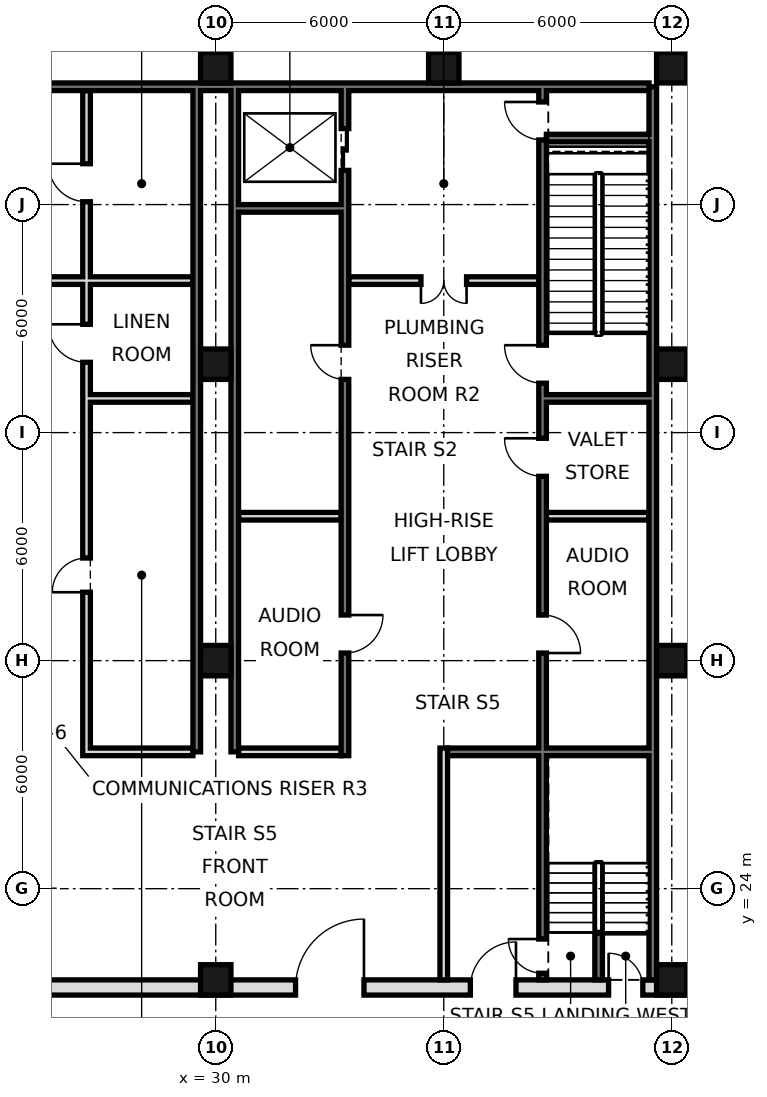
"""IFC4 building model, lengths in metres.
Left out: names, types, materials, properties, quantities, classifications, styles, units other than length and angle.
Written with IfcOpenShell. Run it as: python <this file> out.ifc"""

import sys

from ifc_helpers import new_model, si_unit, direction, frame, frame_2d, origin, origin_2d, place, context, subcontext, project, spatial, rectangle, hollow_rectangle, extrude, element, fill, save


model = new_model("IFC4")
c1 = context("Model", 3, precision=1e-05, world=origin(), true_north=direction((0.0, 1.0)))
c2 = subcontext(c1, "Body", "Model", "MODEL_VIEW")
j1 = project(units=[si_unit("LENGTHUNIT", "METRE"), si_unit("PLANEANGLEUNIT", "RADIAN")], contexts=[c1])
p1 = place(None, origin())
s1 = spatial("IfcSite", under=j1, at=p1, CompositionType="ELEMENT")
p2 = place(p1, origin())
s2 = spatial("IfcBuilding", under=s1, at=p2, CompositionType="ELEMENT")
p3 = place(p2, frame((0.0, 0.0, 44.4)))
s3 = spatial("IfcBuildingStorey", under=s2, at=p3, CompositionType="ELEMENT", Elevation=44.4)
for number, where, z_axis, x_axis in (
    (1, (30.0, 21.6, 0.0), (0.0, 0.0, 1.0), (1.0, 0.0, 0.0)),
    (2, (30.0, 30.0, 0.0), (0.0, 0.0, 1.0), (1.0, 0.0, 0.0)),
    (3, (30.0, 37.8, 0.0), (0.0, 0.0, 1.0), (1.0, 0.0, 0.0)),
    (4, (30.0, 45.6, 0.0), (0.0, 0.0, 1.0), (1.0, 0.0, 0.0)),
    (5, (36.0, 45.6, 0.0), (0.0, 0.0, 1.0), (1.0, 0.0, 0.0)),
    (6, (42.0, 21.6, 0.0), (0.0, 0.0, 1.0), (1.0, 0.0, 0.0)),
    (7, (42.0, 30.0, 0.0), (0.0, 0.0, 1.0), (1.0, 0.0, 0.0)),
    (8, (42.0, 37.8, 0.0), (0.0, 0.0, 1.0), (1.0, 0.0, 0.0)),
    (9, (42.0, 45.6, 0.0), (0.0, 0.0, 1.0), (1.0, 0.0, 0.0)),
):
    element("IfcColumn", number, at=place(p3, frame(where, z_axis=z_axis, x_axis=x_axis)), inside=s3, PredefinedType="COLUMN", context=c2, shape_type="SweptSolid", body=[
        extrude(hollow_rectangle(XDim=0.8, YDim=0.8, WallThickness=0.07, at=origin_2d()), origin(), (0.0, 0.0, 1.0), 5.4),
    ])
p4 = place(p3, frame((41.5, 21.6, 0.0), z_axis=(0.0, 0.0, 1.0), x_axis=(0.0, 1.0, 0.0)))
e10 = element("IfcWall", 10, at=p4, inside=s3, PredefinedType="SOLIDWALL", context=c2, shape_type="SweptSolid", body=[
    extrude(rectangle(XDim=23.5, YDim=0.2, at=frame_2d((11.75, 0.0))), origin(), (0.0, 0.0, 1.0), 5.22),
])
p5 = place(p3, frame((6.6, 45.1, 0.0), z_axis=(0.0, 0.0, 1.0), x_axis=(1.0, 0.0, 0.0)))
e11 = element("IfcWall", 11, at=p5, inside=s3, PredefinedType="SOLIDWALL", context=c2, shape_type="SweptSolid", body=[
    extrude(rectangle(XDim=34.8, YDim=0.2, at=frame_2d((17.4, 0.0))), origin(), (0.0, 0.0, 1.0), 5.22),
])
for number, where, z_axis, x_axis in (
    (12, (29.5, 27.6, 0.0), (0.0, 0.0, 1.0), (0.0, 1.0, 0.0)),
    (13, (30.5, 27.6, 0.0), (0.0, 0.0, 1.0), (0.0, 1.0, 0.0)),
):
    element("IfcWall", number, at=place(p3, frame(where, z_axis=z_axis, x_axis=x_axis)), inside=s3, PredefinedType="SOLIDWALL", context=c2, shape_type="SweptSolid", body=[
        extrude(rectangle(XDim=17.5, YDim=0.2, at=frame_2d((8.75, 0.0))), origin(), (0.0, 0.0, 1.0), 5.22),
    ])
p6 = place(p3, frame((5.6, 21.4, 0.0), z_axis=(0.0, 0.0, 1.0), x_axis=(1.0, 0.0, 0.0)))
e14 = element("IfcWall", 14, at=p6, inside=s3, PredefinedType="SOLIDWALL", context=c2, shape_type="SweptSolid", body=[
    extrude(rectangle(XDim=36.8, YDim=0.4, at=frame_2d((18.4, 0.0))), origin(), (0.0, 0.0, 1.0), 5.22),
])
p7 = place(p6, frame((8.5, 0.0, 0.0)))
e15 = element("IfcOpeningElement", 15, at=p7, cuts=e14, PredefinedType="OPENING", context=c2, shape_type="SweptSolid", body=[
    extrude(rectangle(XDim=1.8, YDim=2.1, at=frame_2d((0.9, 1.05))), frame((0.0, 0.21, 0.0), z_axis=(0.0, -1.0, 0.0), x_axis=(1.0, 0.0, 0.0)), (0.0, 0.0, 1.0), 0.42),
])
p8 = place(p6, frame((17.5, 0.0, 0.0)))
e16 = element("IfcOpeningElement", 16, at=p8, cuts=e14, PredefinedType="OPENING", context=c2, shape_type="SweptSolid", body=[
    extrude(rectangle(XDim=1.8, YDim=2.1, at=frame_2d((0.9, 1.05))), frame((0.0, 0.21, 0.0), z_axis=(0.0, -1.0, 0.0), x_axis=(1.0, 0.0, 0.0)), (0.0, 0.0, 1.0), 0.42),
])
p9 = place(p6, frame((26.5, 0.0, 0.0)))
e17 = element("IfcOpeningElement", 17, at=p9, cuts=e14, PredefinedType="OPENING", context=c2, shape_type="SweptSolid", body=[
    extrude(rectangle(XDim=1.8, YDim=2.1, at=frame_2d((0.9, 1.05))), frame((0.0, 0.21, 0.0), z_axis=(0.0, -1.0, 0.0), x_axis=(1.0, 0.0, 0.0)), (0.0, 0.0, 1.0), 0.42),
])
p10 = place(p6, frame((4.5, 0.0, 0.0)))
e18 = element("IfcOpeningElement", 18, at=p10, cuts=e14, PredefinedType="OPENING", context=c2, shape_type="SweptSolid", body=[
    extrude(rectangle(XDim=1.2, YDim=2.1, at=frame_2d((0.6, 1.05))), frame((0.0, 0.21, 0.0), z_axis=(0.0, -1.0, 0.0), x_axis=(1.0, 0.0, 0.0)), (0.0, 0.0, 1.0), 0.42),
])
p11 = place(p6, frame((31.1, 0.0, 0.0)))
e19 = element("IfcOpeningElement", 19, at=p11, cuts=e14, PredefinedType="OPENING", context=c2, shape_type="SweptSolid", body=[
    extrude(rectangle(XDim=1.2, YDim=2.1, at=frame_2d((0.6, 1.05))), frame((0.0, 0.21, 0.0), z_axis=(0.0, -1.0, 0.0), x_axis=(1.0, 0.0, 0.0)), (0.0, 0.0, 1.0), 0.42),
])
p12 = place(p6, frame((1.163, 0.0, 0.0)))
e20 = element("IfcOpeningElement", 20, at=p12, cuts=e14, PredefinedType="OPENING", context=c2, shape_type="SweptSolid", body=[
    extrude(rectangle(XDim=0.9, YDim=2.1, at=frame_2d((0.45, 1.05))), frame((0.0, 0.21, 0.0), z_axis=(0.0, -1.0, 0.0), x_axis=(1.0, 0.0, 0.0)), (0.0, 0.0, 1.0), 0.42),
])
p13 = place(p6, frame((34.738, 0.0, 0.0)))
e21 = element("IfcOpeningElement", 21, at=p13, cuts=e14, PredefinedType="OPENING", context=c2, shape_type="SweptSolid", body=[
    extrude(rectangle(XDim=0.9, YDim=2.1, at=frame_2d((0.45, 1.05))), frame((0.0, 0.21, 0.0), z_axis=(0.0, -1.0, 0.0), x_axis=(1.0, 0.0, 0.0)), (0.0, 0.0, 1.0), 0.42),
])
p14 = place(p3, frame((26.6, 27.5, 0.0), z_axis=(0.0, 0.0, 1.0), x_axis=(0.0, 1.0, 0.0)))
e22 = element("IfcWall", 22, at=p14, inside=s3, PredefinedType="SOLIDWALL", context=c2, shape_type="SweptSolid", body=[
    extrude(rectangle(XDim=17.5, YDim=0.2, at=frame_2d((8.75, 0.0))), origin(), (0.0, 0.0, 1.0), 5.22),
])
p15 = place(p14, frame((4.3, 0.0, 0.0)))
e23 = element("IfcOpeningElement", 23, at=p15, cuts=e22, PredefinedType="OPENING", context=c2, shape_type="SweptSolid", body=[
    extrude(rectangle(XDim=0.9, YDim=2.1, at=frame_2d((0.45, 1.05))), frame((0.0, 0.11, 0.0), z_axis=(0.0, -1.0, 0.0), x_axis=(1.0, 0.0, 0.0)), (0.0, 0.0, 1.0), 0.22),
])
p16 = place(p14, frame((10.35, 0.0, 0.0)))
e24 = element("IfcOpeningElement", 24, at=p16, cuts=e22, PredefinedType="OPENING", context=c2, shape_type="SweptSolid", body=[
    extrude(rectangle(XDim=1.0, YDim=2.1, at=frame_2d((0.5, 1.05))), frame((0.0, 0.11, 0.0), z_axis=(0.0, -1.0, 0.0), x_axis=(1.0, 0.0, 0.0)), (0.0, 0.0, 1.0), 0.22),
])
p17 = place(p14, frame((14.575, 0.0, 0.0)))
e25 = element("IfcOpeningElement", 25, at=p17, cuts=e22, PredefinedType="OPENING", context=c2, shape_type="SweptSolid", body=[
    extrude(rectangle(XDim=1.0, YDim=2.1, at=frame_2d((0.5, 1.05))), frame((0.0, 0.11, 0.0), z_axis=(0.0, -1.0, 0.0), x_axis=(1.0, 0.0, 0.0)), (0.0, 0.0, 1.0), 0.22),
])
p18 = place(p3, frame((33.4, 27.5, 0.0), z_axis=(0.0, 0.0, 1.0), x_axis=(0.0, 1.0, 0.0)))
e26 = element("IfcWall", 26, at=p18, inside=s3, PredefinedType="SOLIDWALL", context=c2, shape_type="SweptSolid", body=[
    extrude(rectangle(XDim=17.5, YDim=0.2, at=frame_2d((8.75, 0.0))), origin(), (0.0, 0.0, 1.0), 5.22),
])
p19 = place(p18, frame((15.4, 0.0, 0.0)))
e27 = element("IfcOpeningElement", 27, at=p19, cuts=e26, PredefinedType="OPENING", context=c2, shape_type="SweptSolid", body=[
    extrude(rectangle(XDim=1.1, YDim=2.1, at=frame_2d((0.55, 1.05))), frame((0.0, 0.11, 0.0), z_axis=(0.0, -1.0, 0.0), x_axis=(1.0, 0.0, 0.0)), (0.0, 0.0, 1.0), 0.22),
])
p20 = place(p18, frame((2.7, 0.0, 0.0)))
e28 = element("IfcOpeningElement", 28, at=p20, cuts=e26, PredefinedType="OPENING", context=c2, shape_type="SweptSolid", body=[
    extrude(rectangle(XDim=1.0, YDim=2.1, at=frame_2d((0.5, 1.05))), frame((0.0, 0.11, 0.0), z_axis=(0.0, -1.0, 0.0), x_axis=(1.0, 0.0, 0.0)), (0.0, 0.0, 1.0), 0.22),
])
p21 = place(p18, frame((9.9, 0.0, 0.0)))
e29 = element("IfcOpeningElement", 29, at=p21, cuts=e26, PredefinedType="OPENING", context=c2, shape_type="SweptSolid", body=[
    extrude(rectangle(XDim=0.9, YDim=2.1, at=frame_2d((0.45, 1.05))), frame((0.0, 0.11, 0.0), z_axis=(0.0, -1.0, 0.0), x_axis=(1.0, 0.0, 0.0)), (0.0, 0.0, 1.0), 0.22),
])
p22 = place(p3, frame((36.0, 21.6, 0.0), z_axis=(0.0, 0.0, 1.0), x_axis=(0.0, 1.0, 0.0)))
e30 = element("IfcWall", 30, at=p22, inside=s3, PredefinedType="PARTITIONING", context=c2, shape_type="SweptSolid", body=[
    extrude(rectangle(XDim=6.1, YDim=0.2, at=frame_2d((3.05, 0.0))), origin(), (0.0, 0.0, 1.0), 5.22),
])
p23 = place(p3, frame((38.6, 21.6, 0.0), z_axis=(0.0, 0.0, 1.0), x_axis=(0.0, 1.0, 0.0)))
e31 = element("IfcWall", 31, at=p23, inside=s3, PredefinedType="SOLIDWALL", context=c2, shape_type="SweptSolid", body=[
    extrude(rectangle(XDim=23.4, YDim=0.2, at=frame_2d((11.7, 0.0))), origin(), (0.0, 0.0, 1.0), 5.22),
])
p24 = place(p23, frame((8.6, 0.0, 0.0)))
e32 = element("IfcOpeningElement", 32, at=p24, cuts=e31, PredefinedType="OPENING", context=c2, shape_type="SweptSolid", body=[
    extrude(rectangle(XDim=1.0, YDim=2.1, at=frame_2d((0.5, 1.05))), frame((0.0, 0.11, 0.0), z_axis=(0.0, -1.0, 0.0), x_axis=(1.0, 0.0, 0.0)), (0.0, 0.0, 1.0), 0.22),
])
p25 = place(p23, frame((13.25, 0.0, 0.0)))
e33 = element("IfcOpeningElement", 33, at=p25, cuts=e31, PredefinedType="OPENING", context=c2, shape_type="SweptSolid", body=[
    extrude(rectangle(XDim=1.0, YDim=2.1, at=frame_2d((0.5, 1.05))), frame((0.0, 0.11, 0.0), z_axis=(0.0, -1.0, 0.0), x_axis=(1.0, 0.0, 0.0)), (0.0, 0.0, 1.0), 0.22),
])
p26 = place(p23, frame((22.1, 0.0, 0.0)))
e34 = element("IfcOpeningElement", 34, at=p26, cuts=e31, PredefinedType="OPENING", context=c2, shape_type="SweptSolid", body=[
    extrude(rectangle(XDim=1.0, YDim=2.1, at=frame_2d((0.5, 1.05))), frame((0.0, 0.11, 0.0), z_axis=(0.0, -1.0, 0.0), x_axis=(1.0, 0.0, 0.0)), (0.0, 0.0, 1.0), 0.22),
])
p27 = place(p23, frame((15.7, 0.0, 0.0)))
e35 = element("IfcOpeningElement", 35, at=p27, cuts=e31, PredefinedType="OPENING", context=c2, shape_type="SweptSolid", body=[
    extrude(rectangle(XDim=1.0, YDim=2.1, at=frame_2d((0.5, 1.05))), frame((0.0, 0.11, 0.0), z_axis=(0.0, -1.0, 0.0), x_axis=(1.0, 0.0, 0.0)), (0.0, 0.0, 1.0), 0.22),
])
p28 = place(p23, frame((0.175, 0.0, 0.0)))
e36 = element("IfcOpeningElement", 36, at=p28, cuts=e31, PredefinedType="OPENING", context=c2, shape_type="SweptSolid", body=[
    extrude(rectangle(XDim=0.9, YDim=2.1, at=frame_2d((0.45, 1.05))), frame((0.0, 0.11, 0.0), z_axis=(0.0, -1.0, 0.0), x_axis=(1.0, 0.0, 0.0)), (0.0, 0.0, 1.0), 0.22),
])
p29 = place(p3, frame((40.075, 21.6, 0.0), z_axis=(0.0, 0.0, 1.0), x_axis=(0.0, 1.0, 0.0)))
e37 = element("IfcWall", 37, at=p29, inside=s3, PredefinedType="SOLIDWALL", context=c2, shape_type="SweptSolid", body=[
    extrude(rectangle(XDim=1.25, YDim=0.2, at=frame_2d((0.625, 0.0))), origin(), (0.0, 0.0, 1.0), 5.22),
])
p30 = place(p3, frame((26.7, 27.6, 0.0), z_axis=(0.0, 0.0, 1.0), x_axis=(1.0, 0.0, 0.0)))
e38 = element("IfcWall", 38, at=p30, inside=s3, PredefinedType="SOLIDWALL", context=c2, shape_type="SweptSolid", body=[
    extrude(rectangle(XDim=2.7, YDim=0.2, at=frame_2d((1.35, 0.0))), origin(), (0.0, 0.0, 1.0), 5.22),
])
p31 = place(p3, frame((30.6, 27.6, 0.0), z_axis=(0.0, 0.0, 1.0), x_axis=(1.0, 0.0, 0.0)))
e39 = element("IfcWall", 39, at=p31, inside=s3, PredefinedType="PARTITIONING", context=c2, shape_type="SweptSolid", body=[
    extrude(rectangle(XDim=2.7, YDim=0.2, at=frame_2d((1.35, 0.0))), origin(), (0.0, 0.0, 1.0), 5.22),
])
p32 = place(p3, frame((36.1, 27.6, 0.0), z_axis=(0.0, 0.0, 1.0), x_axis=(1.0, 0.0, 0.0)))
e40 = element("IfcWall", 40, at=p32, inside=s3, PredefinedType="SOLIDWALL", context=c2, shape_type="SweptSolid", body=[
    extrude(rectangle(XDim=5.3, YDim=0.2, at=frame_2d((2.65, 0.0))), origin(), (0.0, 0.0, 1.0), 5.22),
])
p33 = place(p3, frame((30.6, 33.8, 0.0), z_axis=(0.0, 0.0, 1.0), x_axis=(1.0, 0.0, 0.0)))
e41 = element("IfcWall", 41, at=p33, inside=s3, PredefinedType="SOLIDWALL", context=c2, shape_type="SweptSolid", body=[
    extrude(rectangle(XDim=2.7, YDim=0.2, at=frame_2d((1.35, 0.0))), origin(), (0.0, 0.0, 1.0), 5.22),
])
p34 = place(p3, frame((38.7, 33.8, 0.0), z_axis=(0.0, 0.0, 1.0), x_axis=(1.0, 0.0, 0.0)))
e42 = element("IfcWall", 42, at=p34, inside=s3, PredefinedType="PARTITIONING", context=c2, shape_type="SweptSolid", body=[
    extrude(rectangle(XDim=2.7, YDim=0.2, at=frame_2d((1.35, 0.0))), origin(), (0.0, 0.0, 1.0), 5.22),
])
for number, where, z_axis, x_axis in (
    (43, (26.7, 36.9, 0.0), (0.0, 0.0, 1.0), (1.0, 0.0, 0.0)),
    (44, (38.7, 36.9, 0.0), (0.0, 0.0, 1.0), (1.0, 0.0, 0.0)),
):
    element("IfcWall", number, at=place(p3, frame(where, z_axis=z_axis, x_axis=x_axis)), inside=s3, PredefinedType="SOLIDWALL", context=c2, shape_type="SweptSolid", body=[
        extrude(rectangle(XDim=2.7, YDim=0.2, at=frame_2d((1.35, 0.0))), origin(), (0.0, 0.0, 1.0), 5.22),
    ])
p35 = place(p3, frame((21.5, 40.0, 0.0), z_axis=(0.0, 0.0, 1.0), x_axis=(1.0, 0.0, 0.0)))
e45 = element("IfcWall", 45, at=p35, inside=s3, PredefinedType="PARTITIONING", context=c2, shape_type="SweptSolid", body=[
    extrude(rectangle(XDim=7.9, YDim=0.2, at=frame_2d((3.95, 0.0))), origin(), (0.0, 0.0, 1.0), 5.22),
])
p36 = place(p35, frame((1.9, 0.0, 0.0)))
e46 = element("IfcOpeningElement", 46, at=p36, cuts=e45, PredefinedType="OPENING", context=c2, shape_type="SweptSolid", body=[
    extrude(rectangle(XDim=1.2, YDim=2.1, at=frame_2d((0.6, 1.05))), frame((0.0, 0.11, 0.0), z_axis=(0.0, -1.0, 0.0), x_axis=(1.0, 0.0, 0.0)), (0.0, 0.0, 1.0), 0.22),
])
p37 = place(p3, frame((33.5, 40.0, 0.0), z_axis=(0.0, 0.0, 1.0), x_axis=(1.0, 0.0, 0.0)))
e47 = element("IfcWall", 47, at=p37, inside=s3, PredefinedType="PARTITIONING", context=c2, shape_type="SweptSolid", body=[
    extrude(rectangle(XDim=5.0, YDim=0.2, at=frame_2d((2.5, 0.0))), origin(), (0.0, 0.0, 1.0), 5.22),
])
p38 = place(p37, frame((1.9, 0.0, 0.0)))
e48 = element("IfcOpeningElement", 48, at=p38, cuts=e47, PredefinedType="OPENING", context=c2, shape_type="SweptSolid", body=[
    extrude(rectangle(XDim=1.2, YDim=2.1, at=frame_2d((0.6, 1.05))), frame((0.0, 0.11, 0.0), z_axis=(0.0, -1.0, 0.0), x_axis=(1.0, 0.0, 0.0)), (0.0, 0.0, 1.0), 0.22),
])
p39 = place(p3, frame((30.6, 41.9, 0.0), z_axis=(0.0, 0.0, 1.0), x_axis=(1.0, 0.0, 0.0)))
e49 = element("IfcWall", 49, at=p39, inside=s3, PredefinedType="SOLIDWALL", context=c2, shape_type="SweptSolid", body=[
    extrude(rectangle(XDim=2.7, YDim=0.2, at=frame_2d((1.35, 0.0))), origin(), (0.0, 0.0, 1.0), 5.22),
])
p40 = place(p3, frame((38.7, 43.75, 0.0), z_axis=(0.0, 0.0, 1.0), x_axis=(1.0, 0.0, 0.0)))
e50 = element("IfcWall", 50, at=p40, inside=s3, PredefinedType="SOLIDWALL", context=c2, shape_type="SweptSolid", body=[
    extrude(rectangle(XDim=2.7, YDim=0.2, at=frame_2d((1.35, 0.0))), origin(), (0.0, 0.0, 1.0), 2.5),
])
p41 = place(p9, frame((1.8, 0.0, 0.0), z_axis=(0.0, 0.0, 1.0), x_axis=(-1.0, 0.0, 0.0)))
e51 = element("IfcDoor", 51, at=p41, inside=s3, OperationType="SINGLE_SWING_LEFT", PredefinedType="DOOR", context=c2, shape_type="SweptSolid", body=[
    extrude(rectangle(XDim=1.8, YDim=2.1, at=frame_2d((0.9, 1.05))), frame((0.0, 0.025, 0.0), z_axis=(0.0, -1.0, 0.0), x_axis=(1.0, 0.0, 0.0)), (0.0, 0.0, 1.0), 0.05),
])
fill(e17, e51)
p42 = place(p11, frame((1.2, 0.0, 0.0), z_axis=(0.0, 0.0, 1.0), x_axis=(-1.0, 0.0, 0.0)))
e52 = element("IfcDoor", 52, at=p42, inside=s3, OperationType="SINGLE_SWING_LEFT", PredefinedType="DOOR", context=c2, shape_type="SweptSolid", body=[
    extrude(rectangle(XDim=1.2, YDim=2.1, at=frame_2d((0.6, 1.05))), frame((0.0, 0.025, 0.0), z_axis=(0.0, -1.0, 0.0), x_axis=(1.0, 0.0, 0.0)), (0.0, 0.0, 1.0), 0.05),
])
fill(e19, e52)
p43 = place(p38, frame((1.2, 0.0, 0.0), z_axis=(0.0, 0.0, 1.0), x_axis=(-1.0, 0.0, 0.0)))
e53 = element("IfcDoor", 53, at=p43, inside=s3, OperationType="DOUBLE_DOOR_SINGLE_SWING", PredefinedType="DOOR", context=c2, shape_type="SweptSolid", body=[
    extrude(rectangle(XDim=1.2, YDim=2.1, at=frame_2d((0.6, 1.05))), frame((0.0, 0.025, 0.0), z_axis=(0.0, -1.0, 0.0), x_axis=(1.0, 0.0, 0.0)), (0.0, 0.0, 1.0), 0.05),
])
fill(e48, e53)
p44 = place(p19, origin())
e54 = element("IfcDoor", 54, at=p44, inside=s3, OperationType="DOUBLE_DOOR_SLIDING", PredefinedType="DOOR", context=c2, shape_type="SweptSolid", body=[
    extrude(rectangle(XDim=1.1, YDim=2.1, at=frame_2d((0.55, 1.05))), frame((0.0, 0.025, 0.0), z_axis=(0.0, -1.0, 0.0), x_axis=(1.0, 0.0, 0.0)), (0.0, 0.0, 1.0), 0.05),
])
fill(e27, e54)
p45 = place(p24, frame((1.0, 0.0, 0.0), z_axis=(0.0, 0.0, 1.0), x_axis=(-1.0, 0.0, 0.0)))
e55 = element("IfcDoor", 55, at=p45, inside=s3, OperationType="SINGLE_SWING_RIGHT", PredefinedType="DOOR", context=c2, shape_type="SweptSolid", body=[
    extrude(rectangle(XDim=1.0, YDim=2.1, at=frame_2d((0.5, 1.05))), frame((0.0, 0.025, 0.0), z_axis=(0.0, -1.0, 0.0), x_axis=(1.0, 0.0, 0.0)), (0.0, 0.0, 1.0), 0.05),
])
fill(e32, e55)
p46 = place(p25, frame((1.0, 0.0, 0.0), z_axis=(0.0, 0.0, 1.0), x_axis=(-1.0, 0.0, 0.0)))
e56 = element("IfcDoor", 56, at=p46, inside=s3, OperationType="SINGLE_SWING_LEFT", PredefinedType="DOOR", context=c2, shape_type="SweptSolid", body=[
    extrude(rectangle(XDim=1.0, YDim=2.1, at=frame_2d((0.5, 1.05))), frame((0.0, 0.025, 0.0), z_axis=(0.0, -1.0, 0.0), x_axis=(1.0, 0.0, 0.0)), (0.0, 0.0, 1.0), 0.05),
])
fill(e33, e56)
p47 = place(p20, origin())
e57 = element("IfcDoor", 57, at=p47, inside=s3, OperationType="SINGLE_SWING_RIGHT", PredefinedType="DOOR", context=c2, shape_type="SweptSolid", body=[
    extrude(rectangle(XDim=1.0, YDim=2.1, at=frame_2d((0.5, 1.05))), frame((0.0, 0.025, 0.0), z_axis=(0.0, -1.0, 0.0), x_axis=(1.0, 0.0, 0.0)), (0.0, 0.0, 1.0), 0.05),
])
fill(e28, e57)
p48 = place(p26, frame((1.0, 0.0, 0.0), z_axis=(0.0, 0.0, 1.0), x_axis=(-1.0, 0.0, 0.0)))
e58 = element("IfcDoor", 58, at=p48, inside=s3, OperationType="SINGLE_SWING_LEFT", PredefinedType="DOOR", context=c2, shape_type="SweptSolid", body=[
    extrude(rectangle(XDim=1.0, YDim=2.1, at=frame_2d((0.5, 1.05))), frame((0.0, 0.025, 0.0), z_axis=(0.0, -1.0, 0.0), x_axis=(1.0, 0.0, 0.0)), (0.0, 0.0, 1.0), 0.05),
])
fill(e34, e58)
p49 = place(p27, frame((1.0, 0.0, 0.0), z_axis=(0.0, 0.0, 1.0), x_axis=(-1.0, 0.0, 0.0)))
e59 = element("IfcDoor", 59, at=p49, inside=s3, OperationType="SINGLE_SWING_LEFT", PredefinedType="DOOR", context=c2, shape_type="SweptSolid", body=[
    extrude(rectangle(XDim=1.0, YDim=2.1, at=frame_2d((0.5, 1.05))), frame((0.0, 0.025, 0.0), z_axis=(0.0, -1.0, 0.0), x_axis=(1.0, 0.0, 0.0)), (0.0, 0.0, 1.0), 0.05),
])
fill(e35, e59)
p50 = place(p28, frame((0.9, 0.0, 0.0), z_axis=(0.0, 0.0, 1.0), x_axis=(-1.0, 0.0, 0.0)))
e60 = element("IfcDoor", 60, at=p50, inside=s3, OperationType="SINGLE_SWING_LEFT", PredefinedType="DOOR", context=c2, shape_type="SweptSolid", body=[
    extrude(rectangle(XDim=0.9, YDim=2.1, at=frame_2d((0.45, 1.05))), frame((0.0, 0.025, 0.0), z_axis=(0.0, -1.0, 0.0), x_axis=(1.0, 0.0, 0.0)), (0.0, 0.0, 1.0), 0.05),
])
fill(e36, e60)
p51 = place(p13, origin())
e61 = element("IfcDoor", 61, at=p51, inside=s3, OperationType="SINGLE_SWING_LEFT", PredefinedType="DOOR", context=c2, shape_type="SweptSolid", body=[
    extrude(rectangle(XDim=0.9, YDim=2.1, at=frame_2d((0.45, 1.05))), frame((0.0, 0.025, 0.0), z_axis=(0.0, -1.0, 0.0), x_axis=(1.0, 0.0, 0.0)), (0.0, 0.0, 1.0), 0.05),
])
fill(e21, e61)
p52 = place(p21, frame((0.9, 0.0, 0.0), z_axis=(0.0, 0.0, 1.0), x_axis=(-1.0, 0.0, 0.0)))
e62 = element("IfcDoor", 62, at=p52, inside=s3, OperationType="SINGLE_SWING_LEFT", PredefinedType="DOOR", context=c2, shape_type="SweptSolid", body=[
    extrude(rectangle(XDim=0.9, YDim=2.1, at=frame_2d((0.45, 1.05))), frame((0.0, 0.025, 0.0), z_axis=(0.0, -1.0, 0.0), x_axis=(1.0, 0.0, 0.0)), (0.0, 0.0, 1.0), 0.05),
])
fill(e29, e62)
p53 = place(p15, origin())
e63 = element("IfcDoor", 63, at=p53, inside=s3, OperationType="SINGLE_SWING_LEFT", PredefinedType="DOOR", context=c2, shape_type="SweptSolid", body=[
    extrude(rectangle(XDim=0.9, YDim=2.1, at=frame_2d((0.45, 1.05))), frame((0.0, 0.025, 0.0), z_axis=(0.0, -1.0, 0.0), x_axis=(1.0, 0.0, 0.0)), (0.0, 0.0, 1.0), 0.05),
])
fill(e23, e63)
p54 = place(p16, frame((1.0, 0.0, 0.0), z_axis=(0.0, 0.0, 1.0), x_axis=(-1.0, 0.0, 0.0)))
e64 = element("IfcDoor", 64, at=p54, inside=s3, OperationType="SINGLE_SWING_LEFT", PredefinedType="DOOR", context=c2, shape_type="SweptSolid", body=[
    extrude(rectangle(XDim=1.0, YDim=2.1, at=frame_2d((0.5, 1.05))), frame((0.0, 0.025, 0.0), z_axis=(0.0, -1.0, 0.0), x_axis=(1.0, 0.0, 0.0)), (0.0, 0.0, 1.0), 0.05),
])
fill(e24, e64)
p55 = place(p17, frame((1.0, 0.0, 0.0), z_axis=(0.0, 0.0, 1.0), x_axis=(-1.0, 0.0, 0.0)))
e65 = element("IfcDoor", 65, at=p55, inside=s3, OperationType="SINGLE_SWING_LEFT", PredefinedType="DOOR", context=c2, shape_type="SweptSolid", body=[
    extrude(rectangle(XDim=1.0, YDim=2.1, at=frame_2d((0.5, 1.05))), frame((0.0, 0.025, 0.0), z_axis=(0.0, -1.0, 0.0), x_axis=(1.0, 0.0, 0.0)), (0.0, 0.0, 1.0), 0.05),
])
fill(e25, e65)
save(model, sys.argv[1])
